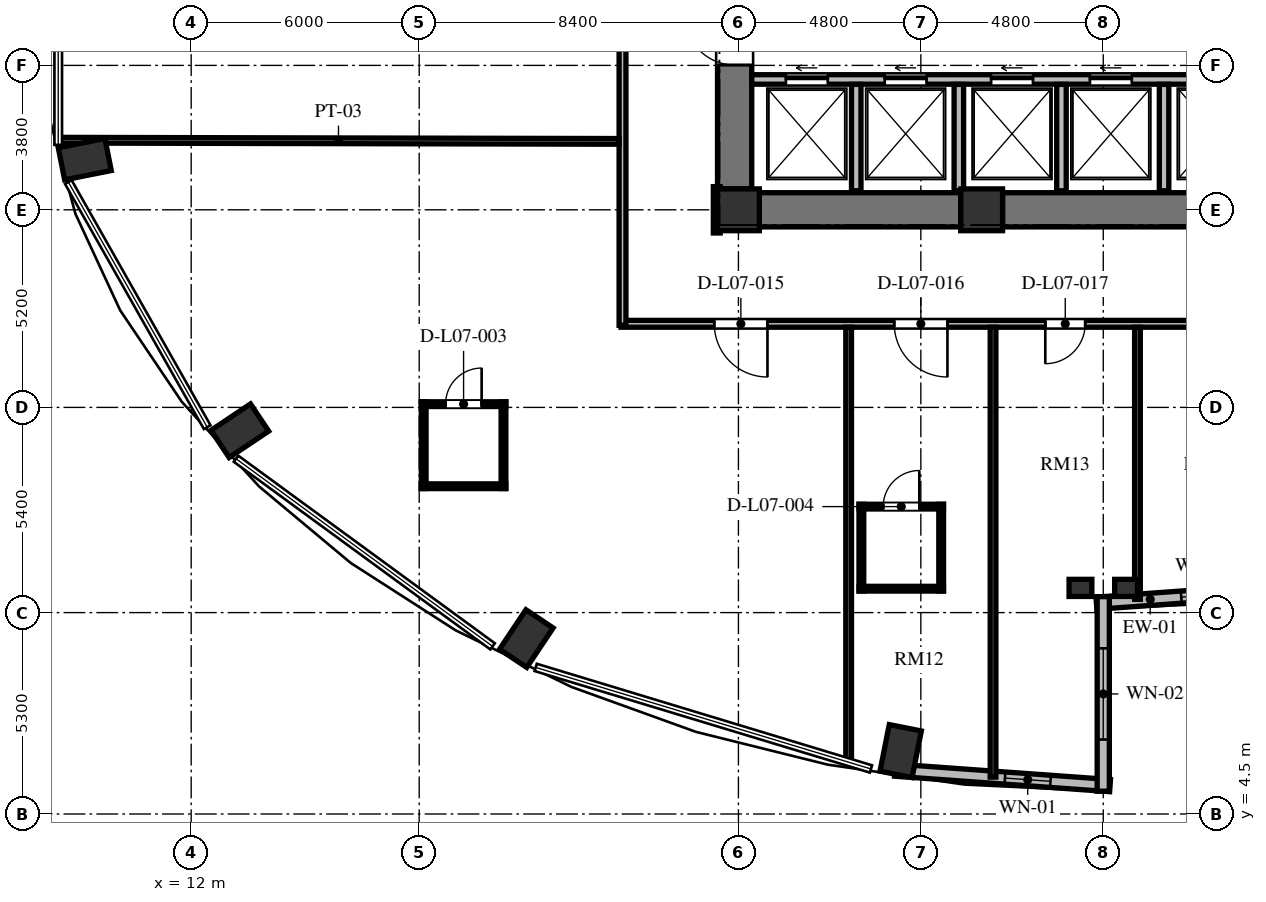
"""IFC4 building model, lengths in metres.
Left out: names, types, materials, properties, quantities, classifications, styles, units other than length and angle.
Written with IfcOpenShell. Run it as: python <this file> out.ifc"""

import sys

from ifc_helpers import new_model, si_unit, direction, frame, frame_2d, origin, origin_2d, place, context, subcontext, project, spatial, rectangle, extrude, element, fill, save


model = new_model("IFC4")
c1 = context("Model", 3, precision=1e-05, world=origin(), true_north=direction((0.0, 1.0)))
c2 = subcontext(c1, "Body", "Model", "MODEL_VIEW")
j1 = project(units=[si_unit("LENGTHUNIT", "METRE"), si_unit("PLANEANGLEUNIT", "RADIAN")], contexts=[c1])
p1 = place(None, origin())
s1 = spatial("IfcSite", under=j1, at=p1, CompositionType="ELEMENT")
p2 = place(p1, origin())
s2 = spatial("IfcBuilding", under=s1, at=p2, CompositionType="ELEMENT")
p3 = place(p2, frame((0.0, 0.0, 32.496)))
s3 = spatial("IfcBuildingStorey", under=s2, at=p3, CompositionType="ELEMENT", Elevation=32.496)
for number, where, z_axis, x_axis in (
    (1, (9.2, 21.732, 0.0), (0.0, 0.0, 1.0), (-0.981, -0.195, 0.0)),
    (2, (13.28, 14.586, 0.0), (0.0, 0.0, 1.0), (-0.831, -0.556, 0.0)),
    (3, (20.819, 9.116, 0.0), (0.0, 0.0, 1.0), (-0.556, -0.831, 0.0)),
    (4, (30.669, 6.156, 0.0), (0.0, 0.0, 1.0), (-0.195, -0.981, 0.0)),
):
    element("IfcColumn", number, at=place(p3, frame(where, z_axis=z_axis, x_axis=x_axis)), inside=s3, PredefinedType="COLUMN", context=c2, shape_type="SweptSolid", body=[
        extrude(rectangle(XDim=1.25, YDim=0.86, at=origin_2d()), origin(), (0.0, 0.0, 1.0), 3.648),
    ])
for number, where, z_axis, x_axis in (
    (5, (26.4, 20.4, 0.0), (0.0, 0.0, 1.0), (1.0, 0.0, 0.0)),
    (6, (32.8, 20.4, 0.0), (0.0, 0.0, 1.0), (1.0, 0.0, 0.0)),
):
    element("IfcColumn", number, at=place(p3, frame(where, z_axis=z_axis, x_axis=x_axis)), inside=s3, PredefinedType="COLUMN", context=c2, shape_type="SweptSolid", body=[
        extrude(rectangle(XDim=1.1, YDim=1.1, at=origin_2d()), origin(), (0.0, 0.0, 1.0), 3.648),
    ])
for number, where, z_axis, x_axis in (
    (7, (35.4, 10.45, 0.0), (0.0, 0.0, 1.0), (1.0, 0.0, 0.0)),
    (8, (36.6, 10.45, 0.0), (0.0, 0.0, 1.0), (1.0, 0.0, 0.0)),
):
    element("IfcColumn", number, at=place(p3, frame(where, z_axis=z_axis, x_axis=x_axis)), inside=s3, PredefinedType="PILASTER", context=c2, shape_type="SweptSolid", body=[
        extrude(rectangle(XDim=0.6, YDim=0.45, at=origin_2d()), origin(), (0.0, 0.0, 1.0), 3.648),
    ])
p4 = place(p3, frame((26.3, 20.95, 0.0), z_axis=(0.0, 0.0, 1.0), x_axis=(0.0, 1.0, 0.0)))
e9 = element("IfcWall", 9, at=p4, inside=s3, PredefinedType="SHEAR", context=c2, shape_type="SweptSolid", body=[
    extrude(rectangle(XDim=14.1, YDim=0.9, at=frame_2d((7.05, 0.0))), origin(), (0.0, 0.0, 1.0), 3.648),
])
p5 = place(p4, frame((6.5, 0.0, 0.0)))
e10 = element("IfcOpeningElement", 10, at=p5, cuts=e9, PredefinedType="OPENING", context=c2, shape_type="SweptSolid", body=[
    extrude(rectangle(XDim=1.2, YDim=2.15, at=frame_2d((0.6, 1.075))), frame((0.0, 0.46, 0.0), z_axis=(0.0, -1.0, 0.0), x_axis=(1.0, 0.0, 0.0)), (0.0, 0.0, 1.0), 0.92),
])
p6 = place(p4, frame((9.6, 0.0, 0.0)))
e11 = element("IfcOpeningElement", 11, at=p6, cuts=e9, PredefinedType="OPENING", context=c2, shape_type="SweptSolid", body=[
    extrude(rectangle(XDim=1.3, YDim=2.2, at=frame_2d((0.65, 1.1))), frame((0.0, 0.46, 0.0), z_axis=(0.0, -1.0, 0.0), x_axis=(1.0, 0.0, 0.0)), (0.0, 0.0, 1.0), 0.92),
])
p7 = place(p4, frame((3.26, 0.0, 0.0)))
e12 = element("IfcOpeningElement", 12, at=p7, cuts=e9, PredefinedType="OPENING", context=c2, shape_type="SweptSolid", body=[
    extrude(rectangle(XDim=1.3, YDim=2.2, at=frame_2d((0.65, 1.1))), frame((0.0, 0.46, 0.0), z_axis=(0.0, -1.0, 0.0), x_axis=(1.0, 0.0, 0.0)), (0.0, 0.0, 1.0), 0.92),
])
p8 = place(p3, frame((26.95, 20.4, 0.0), z_axis=(0.0, 0.0, 1.0), x_axis=(1.0, 0.0, 0.0)))
e13 = element("IfcWall", 13, at=p8, inside=s3, PredefinedType="SHEAR", context=c2, shape_type="SweptSolid", body=[
    extrude(rectangle(XDim=5.3, YDim=0.9, at=frame_2d((2.65, 0.0))), origin(), (0.0, 0.0, 1.0), 3.648),
])
p9 = place(p3, frame((33.35, 20.4, 0.0), z_axis=(0.0, 0.0, 1.0), x_axis=(1.0, 0.0, 0.0)))
e14 = element("IfcWall", 14, at=p9, inside=s3, PredefinedType="SHEAR", context=c2, shape_type="SweptSolid", body=[
    extrude(rectangle(XDim=5.3, YDim=0.9, at=frame_2d((2.65, 0.0))), origin(), (0.0, 0.0, 1.0), 3.648),
])
p10 = place(p3, frame((35.821, 10.047, 0.0), z_axis=(0.0, 0.0, 1.0), x_axis=(0.997422321809, 0.071754525696, 0.0)))
e15 = element("IfcWall", 15, at=p10, inside=s3, PredefinedType="SOLIDWALL", context=c2, shape_type="SweptSolid", body=[
    extrude(rectangle(XDim=5.675, YDim=0.32, at=frame_2d((2.838, 0.0))), origin(), (0.0, 0.0, 1.0), 3.428),
])
p11 = place(p10, frame((2.238, 0.0, 0.85)))
e16 = element("IfcOpeningElement", 16, at=p11, cuts=e15, PredefinedType="OPENING", context=c2, shape_type="SweptSolid", body=[
    extrude(rectangle(XDim=1.2, YDim=1.8, at=frame_2d((0.6, 0.9))), frame((0.0, 0.17, 0.0), z_axis=(0.0, -1.0, 0.0), x_axis=(1.0, 0.0, 0.0)), (0.0, 0.0, 1.0), 0.34),
])
p12 = place(p3, frame((30.519, 5.654, 0.0), z_axis=(0.0, 0.0, 1.0), x_axis=(0.997421878774, -0.071760683825, 0.0)))
e17 = element("IfcWall", 17, at=p12, inside=s3, PredefinedType="SOLIDWALL", context=c2, shape_type="SweptSolid", body=[
    extrude(rectangle(XDim=5.675, YDim=0.32, at=frame_2d((2.837, 0.0))), origin(), (0.0, 0.0, 1.0), 3.428),
])
p13 = place(p12, frame((2.903, 0.0, 0.85)))
e18 = element("IfcOpeningElement", 18, at=p13, cuts=e17, PredefinedType="OPENING", context=c2, shape_type="SweptSolid", body=[
    extrude(rectangle(XDim=1.2, YDim=2.2, at=frame_2d((0.6, 1.1))), frame((0.0, 0.17, 0.0), z_axis=(0.0, -1.0, 0.0), x_axis=(1.0, 0.0, 0.0)), (0.0, 0.0, 1.0), 0.34),
])
p14 = place(p3, frame((36.0, 5.1, 0.0), z_axis=(0.0, 0.0, 1.0), x_axis=(0.0, 1.0, 0.0)))
e19 = element("IfcWall", 19, at=p14, inside=s3, PredefinedType="SOLIDWALL", context=c2, shape_type="SweptSolid", body=[
    extrude(rectangle(XDim=5.12, YDim=0.32, at=frame_2d((2.56, 0.0))), origin(), (0.0, 0.0, 1.0), 3.428),
])
p15 = place(p14, frame((1.36, 0.0, 0.84)))
e20 = element("IfcOpeningElement", 20, at=p15, cuts=e19, PredefinedType="OPENING", context=c2, shape_type="SweptSolid", body=[
    extrude(rectangle(XDim=2.4, YDim=2.04, at=frame_2d((1.2, 1.02))), frame((0.0, 0.17, 0.0), z_axis=(0.0, -1.0, 0.0), x_axis=(1.0, 0.0, 0.0)), (0.0, 0.0, 1.0), 0.34),
])
p16 = place(p3, frame((26.75, 23.83, 0.0), z_axis=(0.0, 0.0, 1.0), x_axis=(1.0, 0.0, 0.0)))
e21 = element("IfcWall", 21, at=p16, inside=s3, PredefinedType="SOLIDWALL", context=c2, shape_type="SweptSolid", body=[
    extrude(rectangle(XDim=16.2, YDim=0.25, at=frame_2d((8.1, 0.0))), origin(), (0.0, 0.0, 1.0), 3.428),
])
p17 = place(p16, frame((0.9, 0.0, 0.0)))
e22 = element("IfcOpeningElement", 22, at=p17, cuts=e21, PredefinedType="OPENING", context=c2, shape_type="SweptSolid", body=[
    extrude(rectangle(XDim=1.1, YDim=2.2, at=frame_2d((0.55, 1.1))), frame((0.0, 0.135, 0.0), z_axis=(0.0, -1.0, 0.0), x_axis=(1.0, 0.0, 0.0)), (0.0, 0.0, 1.0), 0.27),
])
p18 = place(p16, frame((3.5, 0.0, 0.0)))
e23 = element("IfcOpeningElement", 23, at=p18, cuts=e21, PredefinedType="OPENING", context=c2, shape_type="SweptSolid", body=[
    extrude(rectangle(XDim=1.1, YDim=2.2, at=frame_2d((0.55, 1.1))), frame((0.0, 0.135, 0.0), z_axis=(0.0, -1.0, 0.0), x_axis=(1.0, 0.0, 0.0)), (0.0, 0.0, 1.0), 0.27),
])
p19 = place(p16, frame((6.3, 0.0, 0.0)))
e24 = element("IfcOpeningElement", 24, at=p19, cuts=e21, PredefinedType="OPENING", context=c2, shape_type="SweptSolid", body=[
    extrude(rectangle(XDim=1.1, YDim=2.2, at=frame_2d((0.55, 1.1))), frame((0.0, 0.135, 0.0), z_axis=(0.0, -1.0, 0.0), x_axis=(1.0, 0.0, 0.0)), (0.0, 0.0, 1.0), 0.27),
])
p20 = place(p16, frame((8.9, 0.0, 0.0)))
e25 = element("IfcOpeningElement", 25, at=p20, cuts=e21, PredefinedType="OPENING", context=c2, shape_type="SweptSolid", body=[
    extrude(rectangle(XDim=1.1, YDim=2.2, at=frame_2d((0.55, 1.1))), frame((0.0, 0.135, 0.0), z_axis=(0.0, -1.0, 0.0), x_axis=(1.0, 0.0, 0.0)), (0.0, 0.0, 1.0), 0.27),
])
p21 = place(p16, frame((11.7, 0.0, 0.0)))
e26 = element("IfcOpeningElement", 26, at=p21, cuts=e21, PredefinedType="OPENING", context=c2, shape_type="SweptSolid", body=[
    extrude(rectangle(XDim=1.1, YDim=2.2, at=frame_2d((0.55, 1.1))), frame((0.0, 0.135, 0.0), z_axis=(0.0, -1.0, 0.0), x_axis=(1.0, 0.0, 0.0)), (0.0, 0.0, 1.0), 0.27),
])
p22 = place(p16, frame((14.15, 0.0, 0.0)))
e27 = element("IfcOpeningElement", 27, at=p22, cuts=e21, PredefinedType="OPENING", context=c2, shape_type="SweptSolid", body=[
    extrude(rectangle(XDim=1.4, YDim=2.3, at=frame_2d((0.7, 1.15))), frame((0.0, 0.135, 0.0), z_axis=(0.0, -1.0, 0.0), x_axis=(1.0, 0.0, 0.0)), (0.0, 0.0, 1.0), 0.27),
])
for number, where, z_axis, x_axis in (
    (28, (29.5, 20.9, 0.0), (0.0, 0.0, 1.0), (0.0, 1.0, 0.0)),
    (29, (32.2, 20.9, 0.0), (0.0, 0.0, 1.0), (0.0, 1.0, 0.0)),
    (30, (34.9, 20.9, 0.0), (0.0, 0.0, 1.0), (0.0, 1.0, 0.0)),
    (31, (37.6, 20.9, 0.0), (0.0, 0.0, 1.0), (0.0, 1.0, 0.0)),
):
    element("IfcWall", number, at=place(p3, frame(where, z_axis=z_axis, x_axis=x_axis)), inside=s3, PredefinedType="SOLIDWALL", context=c2, shape_type="SweptSolid", body=[
        extrude(rectangle(XDim=2.8, YDim=0.25, at=frame_2d((1.4, 0.0))), origin(), (0.0, 0.0, 1.0), 3.428),
    ])
p23 = place(p3, frame((25.83, 21.01, 0.0), z_axis=(0.0, 0.0, 1.0), x_axis=(0.0, -1.0, 0.0)))
e32 = element("IfcWall", 32, at=p23, inside=s3, PredefinedType="PARTITIONING", context=c2, shape_type="SweptSolid", body=[
    extrude(rectangle(XDim=1.22, YDim=0.18, at=frame_2d((0.61, 0.0))), origin(), (0.0, 0.0, 1.0), 3.428),
])
p24 = place(p3, frame((45.24, 17.4, 0.0), z_axis=(0.0, 0.0, 1.0), x_axis=(-1.0, 0.0, 0.0)))
e33 = element("IfcWall", 33, at=p24, inside=s3, PredefinedType="PARTITIONING", context=c2, shape_type="SweptSolid", body=[
    extrude(rectangle(XDim=21.93, YDim=0.18, at=frame_2d((10.965, 0.0))), origin(), (0.0, 0.0, 1.0), 3.053),
])
p25 = place(p24, frame((18.076, 0.0, 0.0)))
e34 = element("IfcOpeningElement", 34, at=p25, cuts=e33, PredefinedType="OPENING", context=c2, shape_type="SweptSolid", body=[
    extrude(rectangle(XDim=1.4, YDim=2.2, at=frame_2d((0.7, 1.1))), frame((0.0, 0.1, 0.0), z_axis=(0.0, -1.0, 0.0), x_axis=(1.0, 0.0, 0.0)), (0.0, 0.0, 1.0), 0.2),
])
p26 = place(p24, frame((13.34, 0.0, 0.0)))
e35 = element("IfcOpeningElement", 35, at=p26, cuts=e33, PredefinedType="OPENING", context=c2, shape_type="SweptSolid", body=[
    extrude(rectangle(XDim=1.4, YDim=2.2, at=frame_2d((0.7, 1.1))), frame((0.0, 0.1, 0.0), z_axis=(0.0, -1.0, 0.0), x_axis=(1.0, 0.0, 0.0)), (0.0, 0.0, 1.0), 0.2),
])
p27 = place(p24, frame((9.715, 0.0, 0.0)))
e36 = element("IfcOpeningElement", 36, at=p27, cuts=e33, PredefinedType="OPENING", context=c2, shape_type="SweptSolid", body=[
    extrude(rectangle(XDim=1.05, YDim=2.15, at=frame_2d((0.525, 1.075))), frame((0.0, 0.1, 0.0), z_axis=(0.0, -1.0, 0.0), x_axis=(1.0, 0.0, 0.0)), (0.0, 0.0, 1.0), 0.2),
])
p28 = place(p24, frame((4.916, 0.0, 0.0)))
e37 = element("IfcOpeningElement", 37, at=p28, cuts=e33, PredefinedType="OPENING", context=c2, shape_type="SweptSolid", body=[
    extrude(rectangle(XDim=1.05, YDim=2.15, at=frame_2d((0.525, 1.075))), frame((0.0, 0.1, 0.0), z_axis=(0.0, -1.0, 0.0), x_axis=(1.0, 0.0, 0.0)), (0.0, 0.0, 1.0), 0.2),
])
p29 = place(p24, frame((1.729, 0.0, 0.0)))
e38 = element("IfcOpeningElement", 38, at=p29, cuts=e33, PredefinedType="OPENING", context=c2, shape_type="SweptSolid", body=[
    extrude(rectangle(XDim=1.4, YDim=2.2, at=frame_2d((0.7, 1.1))), frame((0.0, 0.1, 0.0), z_axis=(0.0, -1.0, 0.0), x_axis=(1.0, 0.0, 0.0)), (0.0, 0.0, 1.0), 0.2),
])
p30 = place(p3, frame((23.35, 17.36, 0.0), z_axis=(0.0, 0.0, 1.0), x_axis=(0.0, 1.0, 0.0)))
e39 = element("IfcWall", 39, at=p30, inside=s3, PredefinedType="PARTITIONING", context=c2, shape_type="SweptSolid", body=[
    extrude(rectangle(XDim=9.28, YDim=0.18, at=frame_2d((4.64, 0.0))), origin(), (0.0, 0.0, 1.0), 3.428),
])
p31 = place(p3, frame((8.493, 22.231, 0.0), z_axis=(0.0, 0.0, 1.0), x_axis=(0.999997760873, -0.002116187438, 0.0)))
e40 = element("IfcWall", 40, at=p31, inside=s3, PredefinedType="PARTITIONING", context=c2, shape_type="SweptSolid", body=[
    extrude(rectangle(XDim=14.767, YDim=0.15, at=frame_2d((7.384, 0.0))), origin(), (0.0, 0.0, 1.0), 3.428),
])
p32 = place(p3, frame((29.3, 5.876, 0.0), z_axis=(0.0, 0.0, 1.0), x_axis=(0.0, 1.0, 0.0)))
e41 = element("IfcWall", 41, at=p32, inside=s3, PredefinedType="PARTITIONING", context=c2, shape_type="SweptSolid", body=[
    extrude(rectangle(XDim=11.434, YDim=0.15, at=frame_2d((5.717, 0.0))), origin(), (0.0, 0.0, 1.0), 3.428),
])
p33 = place(p3, frame((33.1, 5.471, 0.0), z_axis=(0.0, 0.0, 1.0), x_axis=(0.0, 1.0, 0.0)))
e42 = element("IfcWall", 42, at=p33, inside=s3, PredefinedType="PARTITIONING", context=c2, shape_type="SweptSolid", body=[
    extrude(rectangle(XDim=11.839, YDim=0.15, at=frame_2d((5.919, 0.0))), origin(), (0.0, 0.0, 1.0), 3.428),
])
p34 = place(p3, frame((36.9, 10.15, 0.0), z_axis=(0.0, 0.0, 1.0), x_axis=(0.0, 1.0, 0.0)))
e43 = element("IfcWall", 43, at=p34, inside=s3, PredefinedType="PARTITIONING", context=c2, shape_type="SweptSolid", body=[
    extrude(rectangle(XDim=7.16, YDim=0.15, at=frame_2d((3.58, 0.0))), origin(), (0.0, 0.0, 1.0), 3.428),
])
p35 = place(p3, frame((18.058, 15.285, 0.0), z_axis=(0.0, 0.0, 1.0), x_axis=(1.0, 0.0, 0.0)))
e44 = element("IfcWall", 44, at=p35, inside=s3, PredefinedType="PARTITIONING", context=c2, shape_type="SweptSolid", body=[
    extrude(rectangle(XDim=2.22, YDim=0.125, at=frame_2d((1.11, 0.0))), origin(), (0.0, 0.0, 1.0), 3.428),
])
p36 = place(p35, frame((0.635, 0.0, 0.0)))
e45 = element("IfcOpeningElement", 45, at=p36, cuts=e44, PredefinedType="OPENING", context=c2, shape_type="SweptSolid", body=[
    extrude(rectangle(XDim=0.95, YDim=2.1, at=frame_2d((0.475, 1.05))), frame((0.0, 0.073, 0.0), z_axis=(0.0, -1.0, 0.0), x_axis=(1.0, 0.0, 0.0)), (0.0, 0.0, 1.0), 0.145),
])
p37 = place(p3, frame((18.058, 13.125, 0.0), z_axis=(0.0, 0.0, 1.0), x_axis=(1.0, 0.0, 0.0)))
e46 = element("IfcWall", 46, at=p37, inside=s3, PredefinedType="PARTITIONING", context=c2, shape_type="SweptSolid", body=[
    extrude(rectangle(XDim=2.22, YDim=0.125, at=frame_2d((1.11, 0.0))), origin(), (0.0, 0.0, 1.0), 3.428),
])
for number, where, z_axis, x_axis in (
    (47, (20.218, 13.065, 0.0), (0.0, 0.0, 1.0), (0.0, 1.0, 0.0)),
    (48, (18.118, 13.065, 0.0), (0.0, 0.0, 1.0), (0.0, 1.0, 0.0)),
):
    element("IfcWall", number, at=place(p3, frame(where, z_axis=z_axis, x_axis=x_axis)), inside=s3, PredefinedType="PARTITIONING", context=c2, shape_type="SweptSolid", body=[
        extrude(rectangle(XDim=2.28, YDim=0.125, at=frame_2d((1.14, 0.0))), origin(), (0.0, 0.0, 1.0), 3.428),
    ])
p38 = place(p3, frame((29.575, 12.589, 0.0), z_axis=(0.0, 0.0, 1.0), x_axis=(1.0, 0.0, 0.0)))
e49 = element("IfcWall", 49, at=p38, inside=s3, PredefinedType="PARTITIONING", context=c2, shape_type="SweptSolid", body=[
    extrude(rectangle(XDim=2.22, YDim=0.125, at=frame_2d((1.11, 0.0))), origin(), (0.0, 0.0, 1.0), 3.428),
])
p39 = place(p38, frame((0.635, 0.0, 0.0)))
e50 = element("IfcOpeningElement", 50, at=p39, cuts=e49, PredefinedType="OPENING", context=c2, shape_type="SweptSolid", body=[
    extrude(rectangle(XDim=0.95, YDim=2.1, at=frame_2d((0.475, 1.05))), frame((0.0, 0.073, 0.0), z_axis=(0.0, -1.0, 0.0), x_axis=(1.0, 0.0, 0.0)), (0.0, 0.0, 1.0), 0.145),
])
p40 = place(p3, frame((29.575, 10.429, 0.0), z_axis=(0.0, 0.0, 1.0), x_axis=(1.0, 0.0, 0.0)))
e51 = element("IfcWall", 51, at=p40, inside=s3, PredefinedType="PARTITIONING", context=c2, shape_type="SweptSolid", body=[
    extrude(rectangle(XDim=2.22, YDim=0.125, at=frame_2d((1.11, 0.0))), origin(), (0.0, 0.0, 1.0), 3.428),
])
p41 = place(p3, frame((31.735, 10.369, 0.0), z_axis=(0.0, 0.0, 1.0), x_axis=(0.0, 1.0, 0.0)))
e52 = element("IfcWall", 52, at=p41, inside=s3, PredefinedType="PARTITIONING", context=c2, shape_type="SweptSolid", body=[
    extrude(rectangle(XDim=2.28, YDim=0.125, at=frame_2d((1.14, 0.0))), origin(), (0.0, 0.0, 1.0), 2.813),
])
p42 = place(p3, frame((29.635, 10.369, 0.0), z_axis=(0.0, 0.0, 1.0), x_axis=(0.0, 1.0, 0.0)))
e53 = element("IfcWall", 53, at=p42, inside=s3, PredefinedType="PARTITIONING", context=c2, shape_type="SweptSolid", body=[
    extrude(rectangle(XDim=2.28, YDim=0.125, at=frame_2d((1.14, 0.0))), origin(), (0.0, 0.0, 1.0), 3.428),
])
p43 = place(p11, origin())
e54 = element("IfcWindow", 54, at=p43, inside=s3, PartitioningType="SINGLE_PANEL", PredefinedType="WINDOW", context=c2, shape_type="SweptSolid", body=[
    extrude(rectangle(XDim=1.2, YDim=1.8, at=frame_2d((0.6, 0.9))), frame((0.0, 0.03, 0.0), z_axis=(0.0, -1.0, 0.0), x_axis=(1.0, 0.0, 0.0)), (0.0, 0.0, 1.0), 0.06),
])
fill(e16, e54)
p44 = place(p13, origin())
e55 = element("IfcWindow", 55, at=p44, inside=s3, PartitioningType="SINGLE_PANEL", PredefinedType="WINDOW", context=c2, shape_type="SweptSolid", body=[
    extrude(rectangle(XDim=1.2, YDim=2.2, at=frame_2d((0.6, 1.1))), frame((0.0, 0.03, 0.0), z_axis=(0.0, -1.0, 0.0), x_axis=(1.0, 0.0, 0.0)), (0.0, 0.0, 1.0), 0.06),
])
fill(e18, e55)
p45 = place(p15, origin())
e56 = element("IfcWindow", 56, at=p45, inside=s3, PartitioningType="SINGLE_PANEL", PredefinedType="WINDOW", context=c2, shape_type="SweptSolid", body=[
    extrude(rectangle(XDim=2.4, YDim=2.04, at=frame_2d((1.2, 1.02))), frame((0.0, 0.03, 0.0), z_axis=(0.0, -1.0, 0.0), x_axis=(1.0, 0.0, 0.0)), (0.0, 0.0, 1.0), 0.06),
])
fill(e20, e56)
p46 = place(p7, origin())
e57 = element("IfcDoor", 57, at=p46, inside=s3, OperationType="SINGLE_SWING_RIGHT", PredefinedType="DOOR", context=c2, shape_type="SweptSolid", body=[
    extrude(rectangle(XDim=1.3, YDim=2.2, at=frame_2d((0.65, 1.1))), frame((0.0, 0.025, 0.0), z_axis=(0.0, -1.0, 0.0), x_axis=(1.0, 0.0, 0.0)), (0.0, 0.0, 1.0), 0.05),
])
fill(e12, e57)
p47 = place(p17, origin())
e58 = element("IfcDoor", 58, at=p47, inside=s3, OperationType="SLIDING_TO_LEFT", PredefinedType="DOOR", context=c2, shape_type="SweptSolid", body=[
    extrude(rectangle(XDim=1.1, YDim=2.2, at=frame_2d((0.55, 1.1))), frame((0.0, 0.025, 0.0), z_axis=(0.0, -1.0, 0.0), x_axis=(1.0, 0.0, 0.0)), (0.0, 0.0, 1.0), 0.05),
])
fill(e22, e58)
p48 = place(p18, origin())
e59 = element("IfcDoor", 59, at=p48, inside=s3, OperationType="SLIDING_TO_LEFT", PredefinedType="DOOR", context=c2, shape_type="SweptSolid", body=[
    extrude(rectangle(XDim=1.1, YDim=2.2, at=frame_2d((0.55, 1.1))), frame((0.0, 0.025, 0.0), z_axis=(0.0, -1.0, 0.0), x_axis=(1.0, 0.0, 0.0)), (0.0, 0.0, 1.0), 0.05),
])
fill(e23, e59)
p49 = place(p19, origin())
e60 = element("IfcDoor", 60, at=p49, inside=s3, OperationType="SLIDING_TO_LEFT", PredefinedType="DOOR", context=c2, shape_type="SweptSolid", body=[
    extrude(rectangle(XDim=1.1, YDim=2.2, at=frame_2d((0.55, 1.1))), frame((0.0, 0.025, 0.0), z_axis=(0.0, -1.0, 0.0), x_axis=(1.0, 0.0, 0.0)), (0.0, 0.0, 1.0), 0.05),
])
fill(e24, e60)
p50 = place(p20, origin())
e61 = element("IfcDoor", 61, at=p50, inside=s3, OperationType="SLIDING_TO_LEFT", PredefinedType="DOOR", context=c2, shape_type="SweptSolid", body=[
    extrude(rectangle(XDim=1.1, YDim=2.2, at=frame_2d((0.55, 1.1))), frame((0.0, 0.025, 0.0), z_axis=(0.0, -1.0, 0.0), x_axis=(1.0, 0.0, 0.0)), (0.0, 0.0, 1.0), 0.05),
])
fill(e25, e61)
p51 = place(p36, origin())
e62 = element("IfcDoor", 62, at=p51, inside=s3, OperationType="SINGLE_SWING_RIGHT", PredefinedType="DOOR", context=c2, shape_type="SweptSolid", body=[
    extrude(rectangle(XDim=0.95, YDim=2.1, at=frame_2d((0.475, 1.05))), frame((0.0, 0.025, 0.0), z_axis=(0.0, -1.0, 0.0), x_axis=(1.0, 0.0, 0.0)), (0.0, 0.0, 1.0), 0.05),
])
fill(e45, e62)
p52 = place(p25, origin())
e63 = element("IfcDoor", 63, at=p52, inside=s3, OperationType="SINGLE_SWING_LEFT", PredefinedType="DOOR", context=c2, shape_type="SweptSolid", body=[
    extrude(rectangle(XDim=1.4, YDim=2.2, at=frame_2d((0.7, 1.1))), frame((0.0, 0.025, 0.0), z_axis=(0.0, -1.0, 0.0), x_axis=(1.0, 0.0, 0.0)), (0.0, 0.0, 1.0), 0.05),
])
fill(e34, e63)
p53 = place(p39, origin())
e64 = element("IfcDoor", 64, at=p53, inside=s3, OperationType="SINGLE_SWING_RIGHT", PredefinedType="DOOR", context=c2, shape_type="SweptSolid", body=[
    extrude(rectangle(XDim=0.95, YDim=2.1, at=frame_2d((0.475, 1.05))), frame((0.0, 0.025, 0.0), z_axis=(0.0, -1.0, 0.0), x_axis=(1.0, 0.0, 0.0)), (0.0, 0.0, 1.0), 0.05),
])
fill(e50, e64)
p54 = place(p26, origin())
e65 = element("IfcDoor", 65, at=p54, inside=s3, OperationType="SINGLE_SWING_LEFT", PredefinedType="DOOR", context=c2, shape_type="SweptSolid", body=[
    extrude(rectangle(XDim=1.4, YDim=2.2, at=frame_2d((0.7, 1.1))), frame((0.0, 0.025, 0.0), z_axis=(0.0, -1.0, 0.0), x_axis=(1.0, 0.0, 0.0)), (0.0, 0.0, 1.0), 0.05),
])
fill(e35, e65)
p55 = place(p27, origin())
e66 = element("IfcDoor", 66, at=p55, inside=s3, OperationType="SINGLE_SWING_RIGHT", PredefinedType="DOOR", context=c2, shape_type="SweptSolid", body=[
    extrude(rectangle(XDim=1.05, YDim=2.15, at=frame_2d((0.525, 1.075))), frame((0.0, 0.025, 0.0), z_axis=(0.0, -1.0, 0.0), x_axis=(1.0, 0.0, 0.0)), (0.0, 0.0, 1.0), 0.05),
])
fill(e36, e66)
save(model, sys.argv[1])
